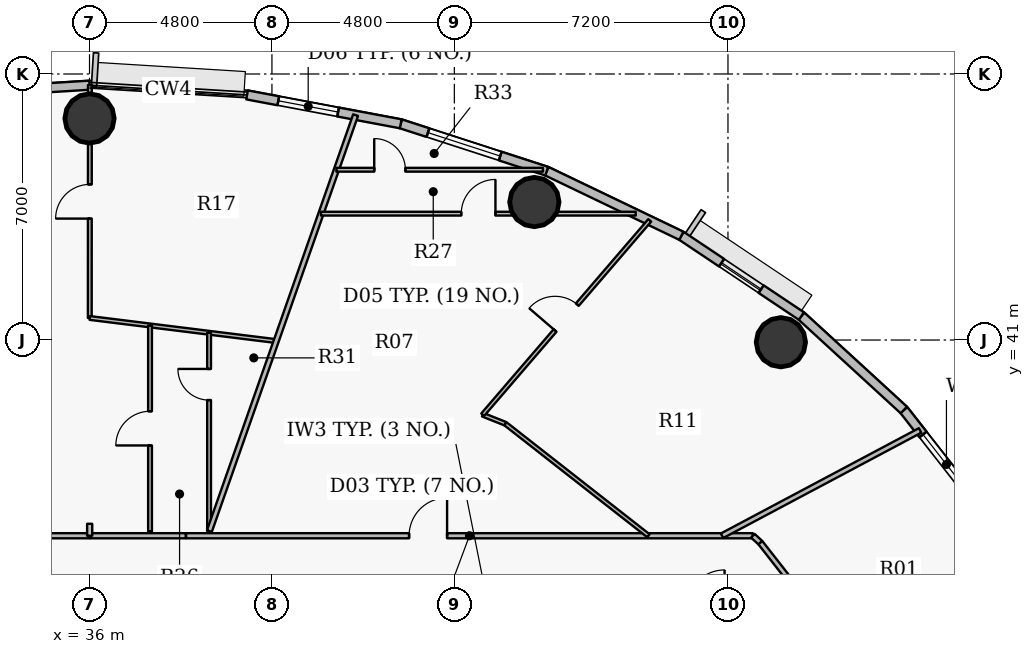
"""IFC4 building model, lengths in metres.
Left out: names, types, materials, properties, quantities, classifications, styles, units other than length and angle.
Written with IfcOpenShell. Run it as: python <this file> out.ifc"""

import sys

from ifc_helpers import new_model, si_unit, direction, frame, frame_2d, origin, origin_2d, place, context, subcontext, project, spatial, rectangle, hollow_circle, extrude, source, transform, mapped, element, fill, save


model = new_model("IFC4")
c1 = context("Model", 3, precision=1e-05, world=origin(), true_north=direction((0.0, 1.0)))
c2 = subcontext(c1, "Body", "Model", "MODEL_VIEW")
j1 = project(units=[si_unit("LENGTHUNIT", "METRE"), si_unit("PLANEANGLEUNIT", "RADIAN")], contexts=[c1])
p1 = place(None, origin())
s1 = spatial("IfcSite", under=j1, at=p1, CompositionType="ELEMENT")
p2 = place(p1, origin())
s2 = spatial("IfcBuilding", under=s1, at=p2, CompositionType="ELEMENT")
p3 = place(p2, frame((0.0, 0.0, 178.65)))
s3 = spatial("IfcBuildingStorey", under=s2, at=p3, CompositionType="ELEMENT", Elevation=178.65)
for number, where, z_axis, x_axis in (
    (1, (54.192, 40.942, 0.0), (0.0, 0.0, 1.0), (1.0, 0.0, 0.0)),
    (2, (47.706, 44.631, 0.0), (0.0, 0.0, 1.0), (1.0, 0.0, 0.0)),
    (3, (36.0, 46.83, 0.0), (0.0, 0.0, 1.0), (1.0, 0.0, 0.0)),
):
    element("IfcColumn", number, at=place(p3, frame(where, z_axis=z_axis, x_axis=x_axis)), inside=s3, PredefinedType="COLUMN", context=c2, shape_type="SweptSolid", body=[
        extrude(hollow_circle(Radius=0.65, WallThickness=0.04, at=origin_2d()), origin(), (0.0, 0.0, 1.0), 3.75),
    ])
p4 = place(p3, frame((57.428, 39.158, 0.0), z_axis=(0.0, 0.0, 1.0), x_axis=(0.616287674549, -0.787521112224, 0.0)))
e4 = element("IfcWall", 4, at=p4, inside=s3, PredefinedType="SOLIDWALL", context=c2, shape_type="SweptSolid", body=[
    extrude(rectangle(XDim=3.517, YDim=0.24, at=frame_2d((1.759, 0.0))), origin(), (0.0, 0.0, 1.0), 3.5),
])
p5 = place(p4, frame((0.819, 0.0, 0.9)))
e5 = element("IfcOpeningElement", 5, at=p5, cuts=e4, PredefinedType="OPENING", context=c2, shape_type="SweptSolid", body=[
    extrude(rectangle(XDim=2.0, YDim=1.75, at=origin_2d()), frame((1.0, 0.13, 0.875), z_axis=(0.0, -1.0, 0.0), x_axis=(1.0, 0.0, 0.0)), (0.0, 0.0, 1.0), 0.26),
])
p6 = place(p3, frame((54.732, 41.631, 0.0), z_axis=(0.0, 0.0, 1.0), x_axis=(0.737076565834, -0.675809245349, 0.0)))
e6 = element("IfcWall", 6, at=p6, inside=s3, PredefinedType="SOLIDWALL", context=c2, shape_type="SweptSolid", body=[
    extrude(rectangle(XDim=3.658, YDim=0.24, at=frame_2d((1.829, 0.0))), origin(), (0.0, 0.0, 1.0), 3.5),
])
p7 = place(p3, frame((51.573, 43.743, 0.0), z_axis=(0.0, 0.0, 1.0), x_axis=(0.831228998277, -0.555930168657, 0.0)))
e7 = element("IfcWall", 7, at=p7, inside=s3, PredefinedType="SOLIDWALL", context=c2, shape_type="SweptSolid", body=[
    extrude(rectangle(XDim=3.8, YDim=0.24, at=frame_2d((1.9, 0.0))), origin(), (0.0, 0.0, 1.0), 3.5),
])
p8 = place(p7, frame((1.275, 0.0, 0.9)))
e8 = element("IfcOpeningElement", 8, at=p8, cuts=e7, PredefinedType="OPENING", context=c2, shape_type="SweptSolid", body=[
    extrude(rectangle(XDim=1.25, YDim=1.65, at=origin_2d()), frame((0.625, 0.13, 0.825), z_axis=(0.0, -1.0, 0.0), x_axis=(1.0, 0.0, 0.0)), (0.0, 0.0, 1.0), 0.26),
])
p9 = place(p3, frame((48.03, 45.444, 0.0), z_axis=(0.0, 0.0, 1.0), x_axis=(0.901564733809, -0.432644231155, 0.0)))
e9 = element("IfcWall", 9, at=p9, inside=s3, PredefinedType="SOLIDWALL", context=c2, shape_type="SweptSolid", body=[
    extrude(rectangle(XDim=3.93, YDim=0.24, at=frame_2d((1.965, 0.0))), origin(), (0.0, 0.0, 1.0), 3.5),
])
p10 = place(p3, frame((44.189, 46.689, 0.0), z_axis=(0.0, 0.0, 1.0), x_axis=(0.951209870236, -0.30854462038, 0.0)))
e10 = element("IfcWall", 10, at=p10, inside=s3, PredefinedType="SOLIDWALL", context=c2, shape_type="SweptSolid", body=[
    extrude(rectangle(XDim=4.038, YDim=0.24, at=frame_2d((2.019, 0.0))), origin(), (0.0, 0.0, 1.0), 3.5),
])
p11 = place(p10, frame((0.753, 0.0, 0.9)))
e11 = element("IfcOpeningElement", 11, at=p11, cuts=e10, PredefinedType="OPENING", context=c2, shape_type="SweptSolid", body=[
    extrude(rectangle(XDim=2.0, YDim=1.75, at=origin_2d()), frame((1.0, 0.13, 0.875), z_axis=(0.0, -1.0, 0.0), x_axis=(1.0, 0.0, 0.0)), (0.0, 0.0, 1.0), 0.26),
])
p12 = place(p3, frame((40.146, 47.449, 0.0), z_axis=(0.0, 0.0, 1.0), x_axis=(0.982788108205, -0.184736391573, 0.0)))
e12 = element("IfcWall", 12, at=p12, inside=s3, PredefinedType="SOLIDWALL", context=c2, shape_type="SweptSolid", body=[
    extrude(rectangle(XDim=4.114, YDim=0.24, at=frame_2d((2.057, 0.0))), origin(), (0.0, 0.0, 1.0), 3.5),
])
p13 = place(p12, frame((0.836, 0.0, 0.9)))
e13 = element("IfcOpeningElement", 13, at=p13, cuts=e12, PredefinedType="OPENING", context=c2, shape_type="SweptSolid", body=[
    extrude(rectangle(XDim=1.6, YDim=1.75, at=origin_2d()), frame((0.8, 0.13, 0.875), z_axis=(0.0, -1.0, 0.0), x_axis=(1.0, 0.0, 0.0)), (0.0, 0.0, 1.0), 0.26),
])
p14 = place(p3, frame((31.854, 47.449, 0.0), z_axis=(0.0, 0.0, 1.0), x_axis=(0.998104600619, 0.061540281305, 0.0)))
e14 = element("IfcWall", 14, at=p14, inside=s3, PredefinedType="SOLIDWALL", context=c2, shape_type="SweptSolid", body=[
    extrude(rectangle(XDim=4.154, YDim=0.24, at=frame_2d((2.077, 0.0))), origin(), (0.0, 0.0, 1.0), 3.5),
])
p15 = place(p14, frame((1.082, 0.0, 0.9)))
e15 = element("IfcOpeningElement", 15, at=p15, cuts=e14, PredefinedType="OPENING", context=c2, shape_type="SweptSolid", body=[
    extrude(rectangle(XDim=2.0, YDim=1.75, at=origin_2d()), frame((1.0, 0.13, 0.875), z_axis=(0.0, -1.0, 0.0), x_axis=(1.0, 0.0, 0.0)), (0.0, 0.0, 1.0), 0.26),
])
p16 = place(p3, frame((24.35, 35.85, 0.0), z_axis=(0.0, 0.0, 1.0), x_axis=(1.0, 0.0, 0.0)))
e16 = element("IfcWall", 16, at=p16, inside=s3, PredefinedType="PARTITIONING", context=c2, shape_type="SweptSolid", body=[
    extrude(rectangle(XDim=11.654, YDim=0.135, at=frame_2d((5.827, 0.0))), origin(), (0.0, 0.0, 1.0), 2.935),
])
p17 = place(p16, frame((7.592, 0.0, 0.0)))
e17 = element("IfcOpeningElement", 17, at=p17, cuts=e16, PredefinedType="OPENING", context=c2, shape_type="SweptSolid", body=[
    extrude(rectangle(XDim=1.0, YDim=2.15, at=origin_2d()), frame((0.5, 0.078, 1.075), z_axis=(0.0, -1.0, 0.0), x_axis=(1.0, 0.0, 0.0)), (0.0, 0.0, 1.0), 0.155),
])
p18 = place(p3, frame((36.007, 41.58, 0.0), z_axis=(0.0, 0.0, 1.0), x_axis=(0.000477973338, 0.999999885771, 0.0)))
e18 = element("IfcWall", 18, at=p18, inside=s3, PredefinedType="PARTITIONING", context=c2, shape_type="SweptSolid", body=[
    extrude(rectangle(XDim=6.129, YDim=0.1, at=frame_2d((3.065, 0.0))), origin(), (0.0, 0.0, 1.0), 2.935),
])
p19 = place(p18, frame((2.615, 0.0, 0.0)))
e19 = element("IfcOpeningElement", 19, at=p19, cuts=e18, PredefinedType="OPENING", context=c2, shape_type="SweptSolid", body=[
    extrude(rectangle(XDim=0.9, YDim=2.1, at=origin_2d()), frame((0.45, 0.06, 1.05), z_axis=(0.0, -1.0, 0.0), x_axis=(1.0, 0.0, 0.0)), (0.0, 0.0, 1.0), 0.12),
])
p20 = place(p3, frame((36.007, 41.58, 0.0), z_axis=(0.0, 0.0, 1.0), x_axis=(0.992395965764, -0.123086340169, 0.0)))
e20 = element("IfcWall", 20, at=p20, inside=s3, PredefinedType="PARTITIONING", context=c2, shape_type="SweptSolid", body=[
    extrude(rectangle(XDim=4.943, YDim=0.1, at=frame_2d((2.471, 0.0))), origin(), (0.0, 0.0, 1.0), 2.935),
])
p21 = place(p3, frame((37.592, 35.968, 0.0), z_axis=(0.0, 0.0, 1.0), x_axis=(0.0, 1.0, 0.0)))
e21 = element("IfcWall", 21, at=p21, inside=s3, PredefinedType="PARTITIONING", context=c2, shape_type="SweptSolid", body=[
    extrude(rectangle(XDim=5.416, YDim=0.1, at=frame_2d((2.708, 0.0))), origin(), (0.0, 0.0, 1.0), 3.5),
])
p22 = place(p21, frame((2.258, 0.0, 0.0)))
e22 = element("IfcOpeningElement", 22, at=p22, cuts=e21, PredefinedType="OPENING", context=c2, shape_type="SweptSolid", body=[
    extrude(rectangle(XDim=0.9, YDim=2.1, at=origin_2d()), frame((0.45, 0.06, 1.05), z_axis=(0.0, -1.0, 0.0), x_axis=(1.0, 0.0, 0.0)), (0.0, 0.0, 1.0), 0.12),
])
p23 = place(p3, frame((38.541, 35.85, 0.0), z_axis=(0.0, 0.0, 1.0), x_axis=(1.0, 0.0, 0.0)))
e23 = element("IfcWall", 23, at=p23, inside=s3, PredefinedType="PARTITIONING", context=c2, shape_type="SweptSolid", body=[
    extrude(rectangle(XDim=14.913, YDim=0.135, at=frame_2d((7.456, 0.0))), origin(), (0.0, 0.0, 1.0), 2.935),
])
p24 = place(p23, frame((5.868, 0.0, 0.0)))
e24 = element("IfcOpeningElement", 24, at=p24, cuts=e23, PredefinedType="OPENING", context=c2, shape_type="SweptSolid", body=[
    extrude(rectangle(XDim=1.0, YDim=2.15, at=origin_2d()), frame((0.5, 0.078, 1.075), z_axis=(0.0, -1.0, 0.0), x_axis=(1.0, 0.0, 0.0)), (0.0, 0.0, 1.0), 0.155),
])
p25 = place(p3, frame((39.146, 35.973, 0.0), z_axis=(0.0, 0.0, 1.0), x_axis=(0.0, 1.0, 0.0)))
e25 = element("IfcWall", 25, at=p25, inside=s3, PredefinedType="PARTITIONING", context=c2, shape_type="SweptSolid", body=[
    extrude(rectangle(XDim=5.218, YDim=0.1, at=frame_2d((2.609, 0.0))), origin(), (0.0, 0.0, 1.0), 3.5),
])
p26 = place(p25, frame((3.446, 0.0, 0.0)))
e26 = element("IfcOpeningElement", 26, at=p26, cuts=e25, PredefinedType="OPENING", context=c2, shape_type="SweptSolid", body=[
    extrude(rectangle(XDim=0.82, YDim=2.1, at=origin_2d()), frame((0.41, 0.06, 1.05), z_axis=(0.0, -1.0, 0.0), x_axis=(1.0, 0.0, 0.0)), (0.0, 0.0, 1.0), 0.12),
])
p27 = place(p3, frame((39.154, 35.972, 0.0), z_axis=(0.0, 0.0, 1.0), x_axis=(0.331639887377, 0.94340605526, 0.0)))
e27 = element("IfcWall", 27, at=p27, inside=s3, PredefinedType="PARTITIONING", context=c2, shape_type="SweptSolid", body=[
    extrude(rectangle(XDim=11.602, YDim=0.135, at=frame_2d((5.801, 0.0))), origin(), (0.0, 0.0, 1.0), 2.935),
])
p28 = place(p3, frame((42.09, 44.325, 0.0), z_axis=(0.0, 0.0, 1.0), x_axis=(1.0, 0.0, 0.0)))
e28 = element("IfcWall", 28, at=p28, inside=s3, PredefinedType="PARTITIONING", context=c2, shape_type="SweptSolid", body=[
    extrude(rectangle(XDim=8.282, YDim=0.1, at=frame_2d((4.141, 0.0))), origin(), (0.0, 0.0, 1.0), 2.935),
])
p29 = place(p28, frame((3.691, 0.0, 0.0)))
e29 = element("IfcOpeningElement", 29, at=p29, cuts=e28, PredefinedType="OPENING", context=c2, shape_type="SweptSolid", body=[
    extrude(rectangle(XDim=0.9, YDim=2.1, at=origin_2d()), frame((0.45, 0.06, 1.05), z_axis=(0.0, -1.0, 0.0), x_axis=(1.0, 0.0, 0.0)), (0.0, 0.0, 1.0), 0.12),
])
p30 = place(p3, frame((42.497, 45.48, 0.0), z_axis=(0.0, 0.0, 1.0), x_axis=(1.0, 0.0, 0.0)))
e30 = element("IfcWall", 30, at=p30, inside=s3, PredefinedType="PARTITIONING", context=c2, shape_type="SweptSolid", body=[
    extrude(rectangle(XDim=5.435, YDim=0.1, at=frame_2d((2.718, 0.0))), origin(), (0.0, 0.0, 1.0), 2.935),
])
p31 = place(p30, frame((0.995, 0.0, 0.0)))
e31 = element("IfcOpeningElement", 31, at=p31, cuts=e30, PredefinedType="OPENING", context=c2, shape_type="SweptSolid", body=[
    extrude(rectangle(XDim=0.82, YDim=2.1, at=origin_2d()), frame((0.41, 0.06, 1.05), z_axis=(0.0, -1.0, 0.0), x_axis=(1.0, 0.0, 0.0)), (0.0, 0.0, 1.0), 0.12),
])
p32 = place(p3, frame((46.346, 39.035, 0.0), z_axis=(0.0, 0.0, 1.0), x_axis=(0.928841988182, -0.370476127423, 0.0)))
e32 = element("IfcWall", 32, at=p32, inside=s3, PredefinedType="PARTITIONING", context=c2, shape_type="SweptSolid", body=[
    extrude(rectangle(XDim=0.645, YDim=0.1, at=frame_2d((0.322, 0.0))), origin(), (0.0, 0.0, 1.0), 3.5),
])
p33 = place(p3, frame((46.346, 39.035, 0.0), z_axis=(0.0, 0.0, 1.0), x_axis=(0.651891052095, 0.758312637504, 0.0)))
e33 = element("IfcWall", 33, at=p33, inside=s3, PredefinedType="PARTITIONING", context=c2, shape_type="SweptSolid", body=[
    extrude(rectangle(XDim=6.742, YDim=0.1, at=frame_2d((3.371, 0.0))), origin(), (0.0, 0.0, 1.0), 2.935),
])
p34 = place(p33, frame((2.921, 0.0, 0.0)))
e34 = element("IfcOpeningElement", 34, at=p34, cuts=e33, PredefinedType="OPENING", context=c2, shape_type="SweptSolid", body=[
    extrude(rectangle(XDim=0.9, YDim=2.1, at=origin_2d()), frame((0.45, 0.06, 1.05), z_axis=(0.0, -1.0, 0.0), x_axis=(1.0, 0.0, 0.0)), (0.0, 0.0, 1.0), 0.12),
])
p35 = place(p3, frame((46.945, 38.796, 0.0), z_axis=(0.0, 0.0, 1.0), x_axis=(0.787326008068, -0.616536906454, 0.0)))
e35 = element("IfcWall", 35, at=p35, inside=s3, PredefinedType="PARTITIONING", context=c2, shape_type="SweptSolid", body=[
    extrude(rectangle(XDim=4.779, YDim=0.1, at=frame_2d((2.389, 0.0))), origin(), (0.0, 0.0, 1.0), 2.935),
])
p36 = place(p3, frame((52.645, 35.85, 0.0), z_axis=(0.0, 0.0, 1.0), x_axis=(0.882944268091, 0.469477815712, 0.0)))
e36 = element("IfcWall", 36, at=p36, inside=s3, PredefinedType="PARTITIONING", context=c2, shape_type="SweptSolid", body=[
    extrude(rectangle(XDim=5.902, YDim=0.135, at=frame_2d((2.951, 0.0))), origin(), (0.0, 0.0, 1.0), 2.935),
])
p37 = place(p3, frame((53.454, 35.85, 0.0), z_axis=(0.0, 0.0, 1.0), x_axis=(0.736667385572, -0.676255249913, 0.0)))
e37 = element("IfcWall", 37, at=p37, inside=s3, PredefinedType="PARTITIONING", context=c2, shape_type="SweptSolid", body=[
    extrude(rectangle(XDim=0.271, YDim=0.135, at=frame_2d((0.135, 0.0))), origin(), (0.0, 0.0, 1.0), 3.5),
])
p38 = place(p3, frame((53.653, 35.667, 0.0), z_axis=(0.0, 0.0, 1.0), x_axis=(0.616302223209, -0.787509726713, 0.0)))
e38 = element("IfcWall", 38, at=p38, inside=s3, PredefinedType="PARTITIONING", context=c2, shape_type="SweptSolid", body=[
    extrude(rectangle(XDim=2.18, YDim=0.135, at=frame_2d((1.09, 0.0))), origin(), (0.0, 0.0, 1.0), 3.5),
])
p39 = place(p3, frame((36.014, 35.85, 0.0), z_axis=(0.0, 0.0, 1.0), x_axis=(1.0, 0.0, 0.0)))
e39 = element("IfcWall", 39, at=p39, inside=s3, PredefinedType="PARTITIONING", context=c2, shape_type="SweptSolid", body=[
    extrude(rectangle(XDim=2.517, YDim=0.135, at=frame_2d((1.259, 0.0))), origin(), (0.0, 0.0, 1.0), 2.935),
])
p40 = place(p3, frame((36.004, 36.165, 0.0), z_axis=(0.0, 0.0, 1.0), x_axis=(0.0, -1.0, 0.0)))
e40 = element("IfcWall", 40, at=p40, inside=s3, PredefinedType="PARTITIONING", context=c2, shape_type="SweptSolid", body=[
    extrude(rectangle(XDim=0.315, YDim=0.135, at=frame_2d((0.157, 0.0))), origin(), (0.0, 0.0, 1.0), 2.935),
])
m1 = source(origin(), c2, "Body", "SweptSolid", [
    extrude(rectangle(XDim=2.0, YDim=1.75, at=origin_2d()), frame((1.0, 0.03, 0.875), z_axis=(0.0, -1.0, 0.0), x_axis=(1.0, 0.0, 0.0)), (0.0, 0.0, 1.0), 0.06),
])
p41 = place(p5, origin())
e41 = element("IfcWindow", 41, at=p41, inside=s3, PartitioningType="DOUBLE_PANEL_VERTICAL", PredefinedType="WINDOW", context=c2, shape_type="MappedRepresentation", body=[
    mapped(m1, transform((0.0, 0.0, 0.0), x_axis=(1.0, 0.0, 0.0), y_axis=(0.0, 1.0, 0.0), z_axis=(0.0, 0.0, 1.0), scale=1.0)),
])
fill(e5, e41)
p42 = place(p11, origin())
e42 = element("IfcWindow", 42, at=p42, inside=s3, PartitioningType="DOUBLE_PANEL_VERTICAL", PredefinedType="WINDOW", context=c2, shape_type="MappedRepresentation", body=[
    mapped(m1, transform((0.0, 0.0, 0.0), x_axis=(1.0, 0.0, 0.0), y_axis=(0.0, 1.0, 0.0), z_axis=(0.0, 0.0, 1.0), scale=1.0)),
])
fill(e11, e42)
m2 = source(origin(), c2, "Body", "SweptSolid", [
    extrude(rectangle(XDim=1.6, YDim=1.75, at=origin_2d()), frame((0.8, 0.03, 0.875), z_axis=(0.0, -1.0, 0.0), x_axis=(1.0, 0.0, 0.0)), (0.0, 0.0, 1.0), 0.06),
])
p43 = place(p13, origin())
e43 = element("IfcWindow", 43, at=p43, inside=s3, PartitioningType="DOUBLE_PANEL_VERTICAL", PredefinedType="WINDOW", context=c2, shape_type="MappedRepresentation", body=[
    mapped(m2, transform((0.0, 0.0, 0.0), x_axis=(1.0, 0.0, 0.0), y_axis=(0.0, 1.0, 0.0), z_axis=(0.0, 0.0, 1.0), scale=1.0)),
])
fill(e13, e43)
m3 = source(origin(), c2, "Body", "SweptSolid", [
    extrude(rectangle(XDim=1.25, YDim=1.65, at=origin_2d()), frame((0.625, 0.03, 0.825), z_axis=(0.0, -1.0, 0.0), x_axis=(1.0, 0.0, 0.0)), (0.0, 0.0, 1.0), 0.06),
])
p44 = place(p8, origin())
e44 = element("IfcWindow", 44, at=p44, inside=s3, PartitioningType="SINGLE_PANEL", PredefinedType="WINDOW", context=c2, shape_type="MappedRepresentation", body=[
    mapped(m3, transform((0.0, 0.0, 0.0), x_axis=(1.0, 0.0, 0.0), y_axis=(0.0, 1.0, 0.0), z_axis=(0.0, 0.0, 1.0), scale=1.0)),
])
fill(e8, e44)
m4 = source(origin(), c2, "Body", "SweptSolid", [
    extrude(rectangle(XDim=1.0, YDim=2.15, at=origin_2d()), frame((0.5, 0.025, 1.075), z_axis=(0.0, -1.0, 0.0), x_axis=(1.0, 0.0, 0.0)), (0.0, 0.0, 1.0), 0.05),
])
p45 = place(p24, origin())
e45 = element("IfcDoor", 45, at=p45, inside=s3, OperationType="SINGLE_SWING_RIGHT", PredefinedType="DOOR", context=c2, shape_type="MappedRepresentation", body=[
    mapped(m4, transform((0.0, 0.0, 0.0), x_axis=(1.0, 0.0, 0.0), y_axis=(0.0, 1.0, 0.0), z_axis=(0.0, 0.0, 1.0), scale=1.0)),
])
fill(e24, e45)
m5 = source(origin(), c2, "Body", "SweptSolid", [
    extrude(rectangle(XDim=0.9, YDim=2.1, at=origin_2d()), frame((0.45, 0.025, 1.05), z_axis=(0.0, -1.0, 0.0), x_axis=(1.0, 0.0, 0.0)), (0.0, 0.0, 1.0), 0.05),
])
p46 = place(p34, origin())
e46 = element("IfcDoor", 46, at=p46, inside=s3, OperationType="SINGLE_SWING_LEFT", PredefinedType="DOOR", context=c2, shape_type="MappedRepresentation", body=[
    mapped(m5, transform((0.0, 0.0, 0.0), x_axis=(1.0, 0.0, 0.0), y_axis=(0.0, 1.0, 0.0), z_axis=(0.0, 0.0, 1.0), scale=1.0)),
])
fill(e34, e46)
p47 = place(p29, origin())
e47 = element("IfcDoor", 47, at=p47, inside=s3, OperationType="SINGLE_SWING_RIGHT", PredefinedType="DOOR", context=c2, shape_type="MappedRepresentation", body=[
    mapped(m5, transform((0.0, 0.0, 0.0), x_axis=(1.0, 0.0, 0.0), y_axis=(0.0, 1.0, 0.0), z_axis=(0.0, 0.0, 1.0), scale=1.0)),
])
fill(e29, e47)
m6 = source(origin(), c2, "Body", "SweptSolid", [
    extrude(rectangle(XDim=0.82, YDim=2.1, at=origin_2d()), frame((0.41, 0.025, 1.05), z_axis=(0.0, -1.0, 0.0), x_axis=(1.0, 0.0, 0.0)), (0.0, 0.0, 1.0), 0.05),
])
p48 = place(p31, origin())
e48 = element("IfcDoor", 48, at=p48, inside=s3, OperationType="SINGLE_SWING_LEFT", PredefinedType="DOOR", context=c2, shape_type="MappedRepresentation", body=[
    mapped(m6, transform((0.0, 0.0, 0.0), x_axis=(1.0, 0.0, 0.0), y_axis=(0.0, 1.0, 0.0), z_axis=(0.0, 0.0, 1.0), scale=1.0)),
])
fill(e31, e48)
p49 = place(p19, origin())
e49 = element("IfcDoor", 49, at=p49, inside=s3, OperationType="SINGLE_SWING_LEFT", PredefinedType="DOOR", context=c2, shape_type="MappedRepresentation", body=[
    mapped(m5, transform((0.0, 0.0, 0.0), x_axis=(1.0, 0.0, 0.0), y_axis=(0.0, 1.0, 0.0), z_axis=(0.0, 0.0, 1.0), scale=1.0)),
])
fill(e19, e49)
p50 = place(p22, origin())
e50 = element("IfcDoor", 50, at=p50, inside=s3, OperationType="SINGLE_SWING_LEFT", PredefinedType="DOOR", context=c2, shape_type="MappedRepresentation", body=[
    mapped(m5, transform((0.0, 0.0, 0.0), x_axis=(1.0, 0.0, 0.0), y_axis=(0.0, 1.0, 0.0), z_axis=(0.0, 0.0, 1.0), scale=1.0)),
])
fill(e22, e50)
p51 = place(p26, origin())
e51 = element("IfcDoor", 51, at=p51, inside=s3, OperationType="SINGLE_SWING_RIGHT", PredefinedType="DOOR", context=c2, shape_type="MappedRepresentation", body=[
    mapped(m6, transform((0.0, 0.0, 0.0), x_axis=(1.0, 0.0, 0.0), y_axis=(0.0, 1.0, 0.0), z_axis=(0.0, 0.0, 1.0), scale=1.0)),
])
fill(e26, e51)
save(model, sys.argv[1])
